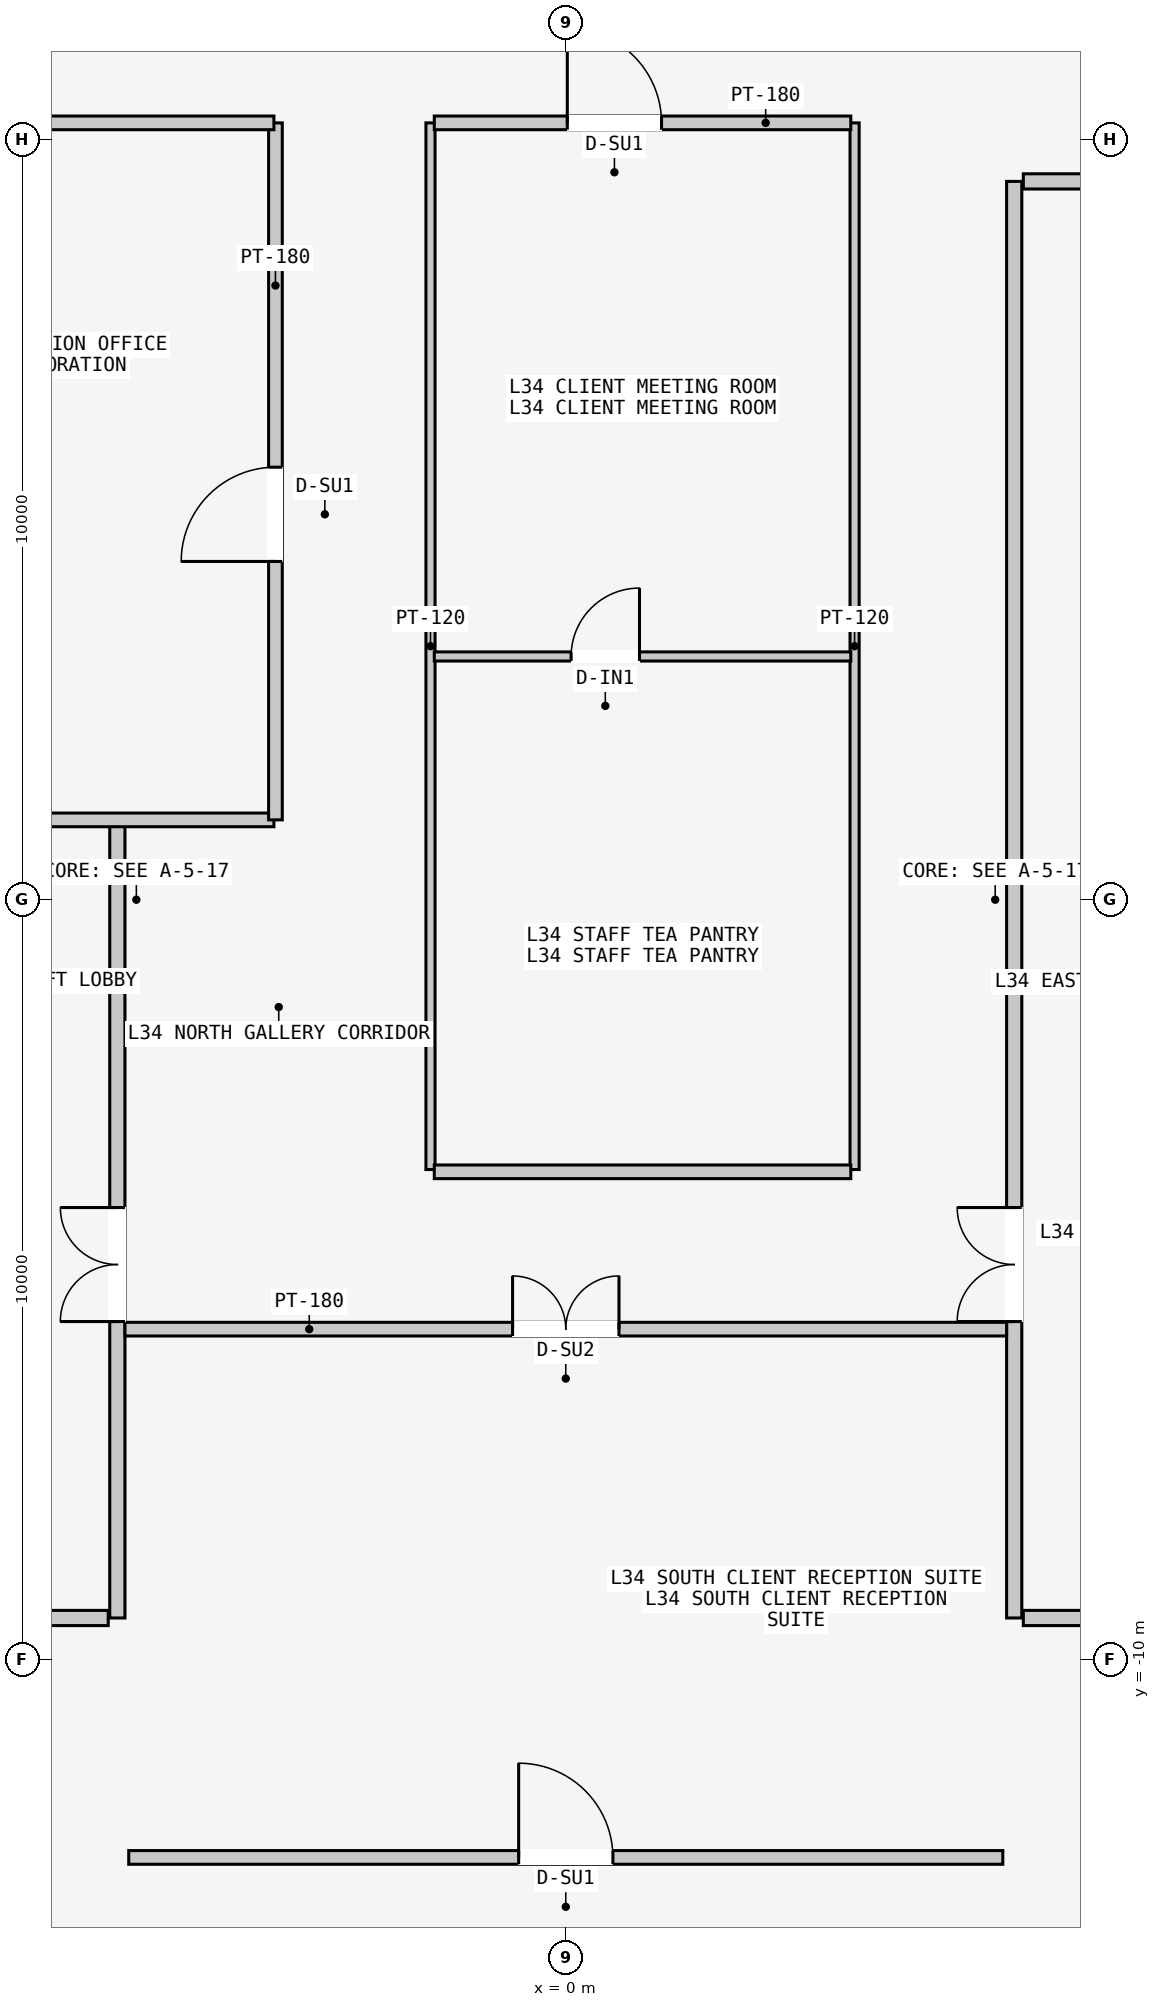
"""IFC4 building model, lengths in metres.
Left out: names, types, materials, properties, quantities, classifications, styles, units other than length and angle.
Written with IfcOpenShell. Run it as: python <this file> out.ifc"""

import sys

from ifc_helpers import new_model, si_unit, direction, frame, frame_2d, origin, place, context, subcontext, project, spatial, rectangle, extrude, element, fill, save


model = new_model("IFC4")
c1 = context("Model", 3, precision=1e-05, world=origin(), true_north=direction((0.0, 1.0)))
c2 = subcontext(c1, "Body", "Model", "MODEL_VIEW")
j1 = project(units=[si_unit("LENGTHUNIT", "METRE"), si_unit("PLANEANGLEUNIT", "RADIAN")], contexts=[c1])
p1 = place(None, origin())
s1 = spatial("IfcSite", under=j1, at=p1, CompositionType="ELEMENT")
p2 = place(p1, origin())
s2 = spatial("IfcBuilding", under=s1, at=p2, CompositionType="ELEMENT")
p3 = place(p2, frame((0.0, 0.0, 131.4)))
s3 = spatial("IfcBuildingStorey", under=s2, at=p3, CompositionType="ELEMENT", Elevation=131.4)
p4 = place(p3, frame((-5.9, -9.45, 0.0), z_axis=(0.0, 0.0, 1.0), x_axis=(0.0, 1.0, 0.0)))
e1 = element("IfcWall", 1, at=p4, inside=s3, PredefinedType="PARTITIONING", context=c2, shape_type="SweptSolid", body=[
    extrude(rectangle(XDim=10.5, YDim=0.2, at=frame_2d((5.25, 0.0))), origin(), (0.0, 0.0, 1.0), 3.4),
])
p5 = place(p4, frame((3.9, 0.0, 0.0)))
e2 = element("IfcOpeningElement", 2, at=p5, cuts=e1, PredefinedType="OPENING", context=c2, shape_type="SweptSolid", body=[
    extrude(rectangle(XDim=1.5, YDim=2.2, at=frame_2d((0.75, 1.1))), frame((0.0, 0.11, 0.0), z_axis=(0.0, -1.0, 0.0), x_axis=(1.0, 0.0, 0.0)), (0.0, 0.0, 1.0), 0.22),
])
p6 = place(p3, frame((-6.02, -9.45, 0.0), z_axis=(0.0, 0.0, 1.0), x_axis=(-1.0, 0.0, 0.0)))
e3 = element("IfcWall", 3, at=p6, inside=s3, PredefinedType="PARTITIONING", context=c2, shape_type="SweptSolid", body=[
    extrude(rectangle(XDim=1.8, YDim=0.2, at=frame_2d((0.9, 0.0))), origin(), (0.0, 0.0, 1.0), 3.4),
])
p7 = place(p3, frame((5.9, -9.45, 0.0), z_axis=(0.0, 0.0, 1.0), x_axis=(0.0, 1.0, 0.0)))
e4 = element("IfcWall", 4, at=p7, inside=s3, PredefinedType="PARTITIONING", context=c2, shape_type="SweptSolid", body=[
    extrude(rectangle(XDim=18.9, YDim=0.2, at=frame_2d((9.45, 0.0))), origin(), (0.0, 0.0, 1.0), 3.4),
])
p8 = place(p7, frame((3.9, 0.0, 0.0)))
e5 = element("IfcOpeningElement", 5, at=p8, cuts=e4, PredefinedType="OPENING", context=c2, shape_type="SweptSolid", body=[
    extrude(rectangle(XDim=1.5, YDim=2.2, at=frame_2d((0.75, 1.1))), frame((0.0, 0.11, 0.0), z_axis=(0.0, -1.0, 0.0), x_axis=(1.0, 0.0, 0.0)), (0.0, 0.0, 1.0), 0.22),
])
for number, where, z_axis, x_axis in (
    (6, (6.02, -9.45, 0.0), (0.0, 0.0, 1.0), (1.0, 0.0, 0.0)),
    (7, (6.02, 9.45, 0.0), (0.0, 0.0, 1.0), (1.0, 0.0, 0.0)),
):
    element("IfcWall", number, at=place(p3, frame(where, z_axis=z_axis, x_axis=x_axis)), inside=s3, PredefinedType="PARTITIONING", context=c2, shape_type="SweptSolid", body=[
        extrude(rectangle(XDim=1.8, YDim=0.2, at=frame_2d((0.9, 0.0))), origin(), (0.0, 0.0, 1.0), 3.4),
    ])
p9 = place(p3, frame((-10.05, 1.05, 0.0), z_axis=(0.0, 0.0, 1.0), x_axis=(1.0, 0.0, 0.0)))
e8 = element("IfcWall", 8, at=p9, inside=s3, PredefinedType="PARTITIONING", context=c2, shape_type="SweptSolid", body=[
    extrude(rectangle(XDim=6.21, YDim=0.18, at=frame_2d((3.105, 0.0))), origin(), (0.0, 0.0, 1.0), 3.4),
])
p10 = place(p3, frame((-3.82, 1.05, 0.0), z_axis=(0.0, 0.0, 1.0), x_axis=(0.0, 1.0, 0.0)))
e9 = element("IfcWall", 9, at=p10, inside=s3, PredefinedType="PARTITIONING", context=c2, shape_type="SweptSolid", body=[
    extrude(rectangle(XDim=9.17, YDim=0.18, at=frame_2d((4.585, 0.0))), origin(), (0.0, 0.0, 1.0), 3.4),
])
p11 = place(p10, frame((3.4, 0.0, 0.0)))
e10 = element("IfcOpeningElement", 10, at=p11, cuts=e9, PredefinedType="OPENING", context=c2, shape_type="SweptSolid", body=[
    extrude(rectangle(XDim=1.24, YDim=2.24, at=frame_2d((0.62, 1.12))), frame((0.0, 0.1, 0.0), z_axis=(0.0, -1.0, 0.0), x_axis=(1.0, 0.0, 0.0)), (0.0, 0.0, 1.0), 0.2),
])
p12 = place(p3, frame((-7.5, 10.22, 0.0), z_axis=(0.0, 0.0, 1.0), x_axis=(1.0, 0.0, 0.0)))
e11 = element("IfcWall", 11, at=p12, inside=s3, PredefinedType="PARTITIONING", context=c2, shape_type="SweptSolid", body=[
    extrude(rectangle(XDim=3.66, YDim=0.18, at=frame_2d((1.83, 0.0))), origin(), (0.0, 0.0, 1.0), 3.4),
])
for number, where, z_axis, x_axis in (
    (12, (-1.78, -3.55, 0.0), (0.0, 0.0, 1.0), (0.0, 1.0, 0.0)),
    (13, (3.8, -3.55, 0.0), (0.0, 0.0, 1.0), (0.0, 1.0, 0.0)),
):
    element("IfcWall", number, at=place(p3, frame(where, z_axis=z_axis, x_axis=x_axis)), inside=s3, PredefinedType="PARTITIONING", context=c2, shape_type="SweptSolid", body=[
        extrude(rectangle(XDim=13.77, YDim=0.12, at=frame_2d((6.885, 0.0))), origin(), (0.0, 0.0, 1.0), 3.4),
    ])
p13 = place(p3, frame((-1.73, -3.58, 0.0), z_axis=(0.0, 0.0, 1.0), x_axis=(1.0, 0.0, 0.0)))
e14 = element("IfcWall", 14, at=p13, inside=s3, PredefinedType="PARTITIONING", context=c2, shape_type="SweptSolid", body=[
    extrude(rectangle(XDim=5.48, YDim=0.18, at=frame_2d((2.74, 0.0))), origin(), (0.0, 0.0, 1.0), 3.4),
])
p14 = place(p3, frame((-1.73, 3.2, 0.0), z_axis=(0.0, 0.0, 1.0), x_axis=(1.0, 0.0, 0.0)))
e15 = element("IfcWall", 15, at=p14, inside=s3, PredefinedType="PARTITIONING", context=c2, shape_type="SweptSolid", body=[
    extrude(rectangle(XDim=5.48, YDim=0.12, at=frame_2d((2.74, 0.0))), origin(), (0.0, 0.0, 1.0), 3.4),
])
p15 = place(p14, frame((1.8, 0.0, 0.0)))
e16 = element("IfcOpeningElement", 16, at=p15, cuts=e15, PredefinedType="OPENING", context=c2, shape_type="SweptSolid", body=[
    extrude(rectangle(XDim=0.9, YDim=2.15, at=frame_2d((0.45, 1.075))), frame((0.0, 0.07, 0.0), z_axis=(0.0, -1.0, 0.0), x_axis=(1.0, 0.0, 0.0)), (0.0, 0.0, 1.0), 0.14),
])
p16 = place(p3, frame((-1.73, 10.22, 0.0), z_axis=(0.0, 0.0, 1.0), x_axis=(1.0, 0.0, 0.0)))
e17 = element("IfcWall", 17, at=p16, inside=s3, PredefinedType="PARTITIONING", context=c2, shape_type="SweptSolid", body=[
    extrude(rectangle(XDim=5.48, YDim=0.18, at=frame_2d((2.74, 0.0))), origin(), (0.0, 0.0, 1.0), 3.4),
])
p17 = place(p16, frame((1.75, 0.0, 0.0)))
e18 = element("IfcOpeningElement", 18, at=p17, cuts=e17, PredefinedType="OPENING", context=c2, shape_type="SweptSolid", body=[
    extrude(rectangle(XDim=1.24, YDim=2.24, at=frame_2d((0.62, 1.12))), frame((0.0, 0.1, 0.0), z_axis=(0.0, -1.0, 0.0), x_axis=(1.0, 0.0, 0.0)), (0.0, 0.0, 1.0), 0.2),
])
p18 = place(p3, frame((-5.8, -5.65, 0.0), z_axis=(0.0, 0.0, 1.0), x_axis=(1.0, 0.0, 0.0)))
e19 = element("IfcWall", 19, at=p18, inside=s3, PredefinedType="PARTITIONING", context=c2, shape_type="SweptSolid", body=[
    extrude(rectangle(XDim=11.6, YDim=0.18, at=frame_2d((5.8, 0.0))), origin(), (0.0, 0.0, 1.0), 3.4),
])
p19 = place(p18, frame((5.1, 0.0, 0.0)))
e20 = element("IfcOpeningElement", 20, at=p19, cuts=e19, PredefinedType="OPENING", context=c2, shape_type="SweptSolid", body=[
    extrude(rectangle(XDim=1.4, YDim=2.2, at=frame_2d((0.7, 1.1))), frame((0.0, 0.1, 0.0), z_axis=(0.0, -1.0, 0.0), x_axis=(1.0, 0.0, 0.0)), (0.0, 0.0, 1.0), 0.2),
])
p20 = place(p3, frame((-5.75, -12.6, 0.0), z_axis=(0.0, 0.0, 1.0), x_axis=(1.0, 0.0, 0.0)))
e21 = element("IfcWall", 21, at=p20, inside=s3, PredefinedType="PARTITIONING", context=c2, shape_type="SweptSolid", body=[
    extrude(rectangle(XDim=11.5, YDim=0.18, at=frame_2d((5.75, 0.0))), origin(), (0.0, 0.0, 1.0), 3.4),
])
p21 = place(p20, frame((5.13, 0.0, 0.0)))
e22 = element("IfcOpeningElement", 22, at=p21, cuts=e21, PredefinedType="OPENING", context=c2, shape_type="SweptSolid", body=[
    extrude(rectangle(XDim=1.24, YDim=2.24, at=frame_2d((0.62, 1.12))), frame((0.0, 0.1, 0.0), z_axis=(0.0, -1.0, 0.0), x_axis=(1.0, 0.0, 0.0)), (0.0, 0.0, 1.0), 0.2),
])
p22 = place(p5, origin())
e23 = element("IfcDoor", 23, at=p22, inside=s3, OperationType="DOUBLE_DOOR_SINGLE_SWING", PredefinedType="DOOR", context=c2, shape_type="SweptSolid", body=[
    extrude(rectangle(XDim=1.5, YDim=2.2, at=frame_2d((0.75, 1.1))), frame((0.0, 0.025, 0.0), z_axis=(0.0, -1.0, 0.0), x_axis=(1.0, 0.0, 0.0)), (0.0, 0.0, 1.0), 0.05),
])
fill(e2, e23)
p23 = place(p8, origin())
e24 = element("IfcDoor", 24, at=p23, inside=s3, OperationType="DOUBLE_DOOR_SINGLE_SWING", PredefinedType="DOOR", context=c2, shape_type="SweptSolid", body=[
    extrude(rectangle(XDim=1.5, YDim=2.2, at=frame_2d((0.75, 1.1))), frame((0.0, 0.025, 0.0), z_axis=(0.0, -1.0, 0.0), x_axis=(1.0, 0.0, 0.0)), (0.0, 0.0, 1.0), 0.05),
])
fill(e5, e24)
p24 = place(p11, origin())
e25 = element("IfcDoor", 25, at=p24, inside=s3, OperationType="SINGLE_SWING_LEFT", PredefinedType="DOOR", context=c2, shape_type="SweptSolid", body=[
    extrude(rectangle(XDim=1.24, YDim=2.24, at=frame_2d((0.62, 1.12))), frame((0.0, 0.025, 0.0), z_axis=(0.0, -1.0, 0.0), x_axis=(1.0, 0.0, 0.0)), (0.0, 0.0, 1.0), 0.05),
])
fill(e10, e25)
p25 = place(p15, origin())
e26 = element("IfcDoor", 26, at=p25, inside=s3, OperationType="SINGLE_SWING_RIGHT", PredefinedType="DOOR", context=c2, shape_type="SweptSolid", body=[
    extrude(rectangle(XDim=0.9, YDim=2.15, at=frame_2d((0.45, 1.075))), frame((0.0, 0.025, 0.0), z_axis=(0.0, -1.0, 0.0), x_axis=(1.0, 0.0, 0.0)), (0.0, 0.0, 1.0), 0.05),
])
fill(e16, e26)
p26 = place(p17, origin())
e27 = element("IfcDoor", 27, at=p26, inside=s3, OperationType="SINGLE_SWING_LEFT", PredefinedType="DOOR", context=c2, shape_type="SweptSolid", body=[
    extrude(rectangle(XDim=1.24, YDim=2.24, at=frame_2d((0.62, 1.12))), frame((0.0, 0.025, 0.0), z_axis=(0.0, -1.0, 0.0), x_axis=(1.0, 0.0, 0.0)), (0.0, 0.0, 1.0), 0.05),
])
fill(e18, e27)
p27 = place(p19, origin())
e28 = element("IfcDoor", 28, at=p27, inside=s3, OperationType="DOUBLE_DOOR_SINGLE_SWING", PredefinedType="DOOR", context=c2, shape_type="SweptSolid", body=[
    extrude(rectangle(XDim=1.4, YDim=2.2, at=frame_2d((0.7, 1.1))), frame((0.0, 0.025, 0.0), z_axis=(0.0, -1.0, 0.0), x_axis=(1.0, 0.0, 0.0)), (0.0, 0.0, 1.0), 0.05),
])
fill(e20, e28)
p28 = place(p21, origin())
e29 = element("IfcDoor", 29, at=p28, inside=s3, OperationType="SINGLE_SWING_LEFT", PredefinedType="DOOR", context=c2, shape_type="SweptSolid", body=[
    extrude(rectangle(XDim=1.24, YDim=2.24, at=frame_2d((0.62, 1.12))), frame((0.0, 0.025, 0.0), z_axis=(0.0, -1.0, 0.0), x_axis=(1.0, 0.0, 0.0)), (0.0, 0.0, 1.0), 0.05),
])
fill(e22, e29)
save(model, sys.argv[1])
